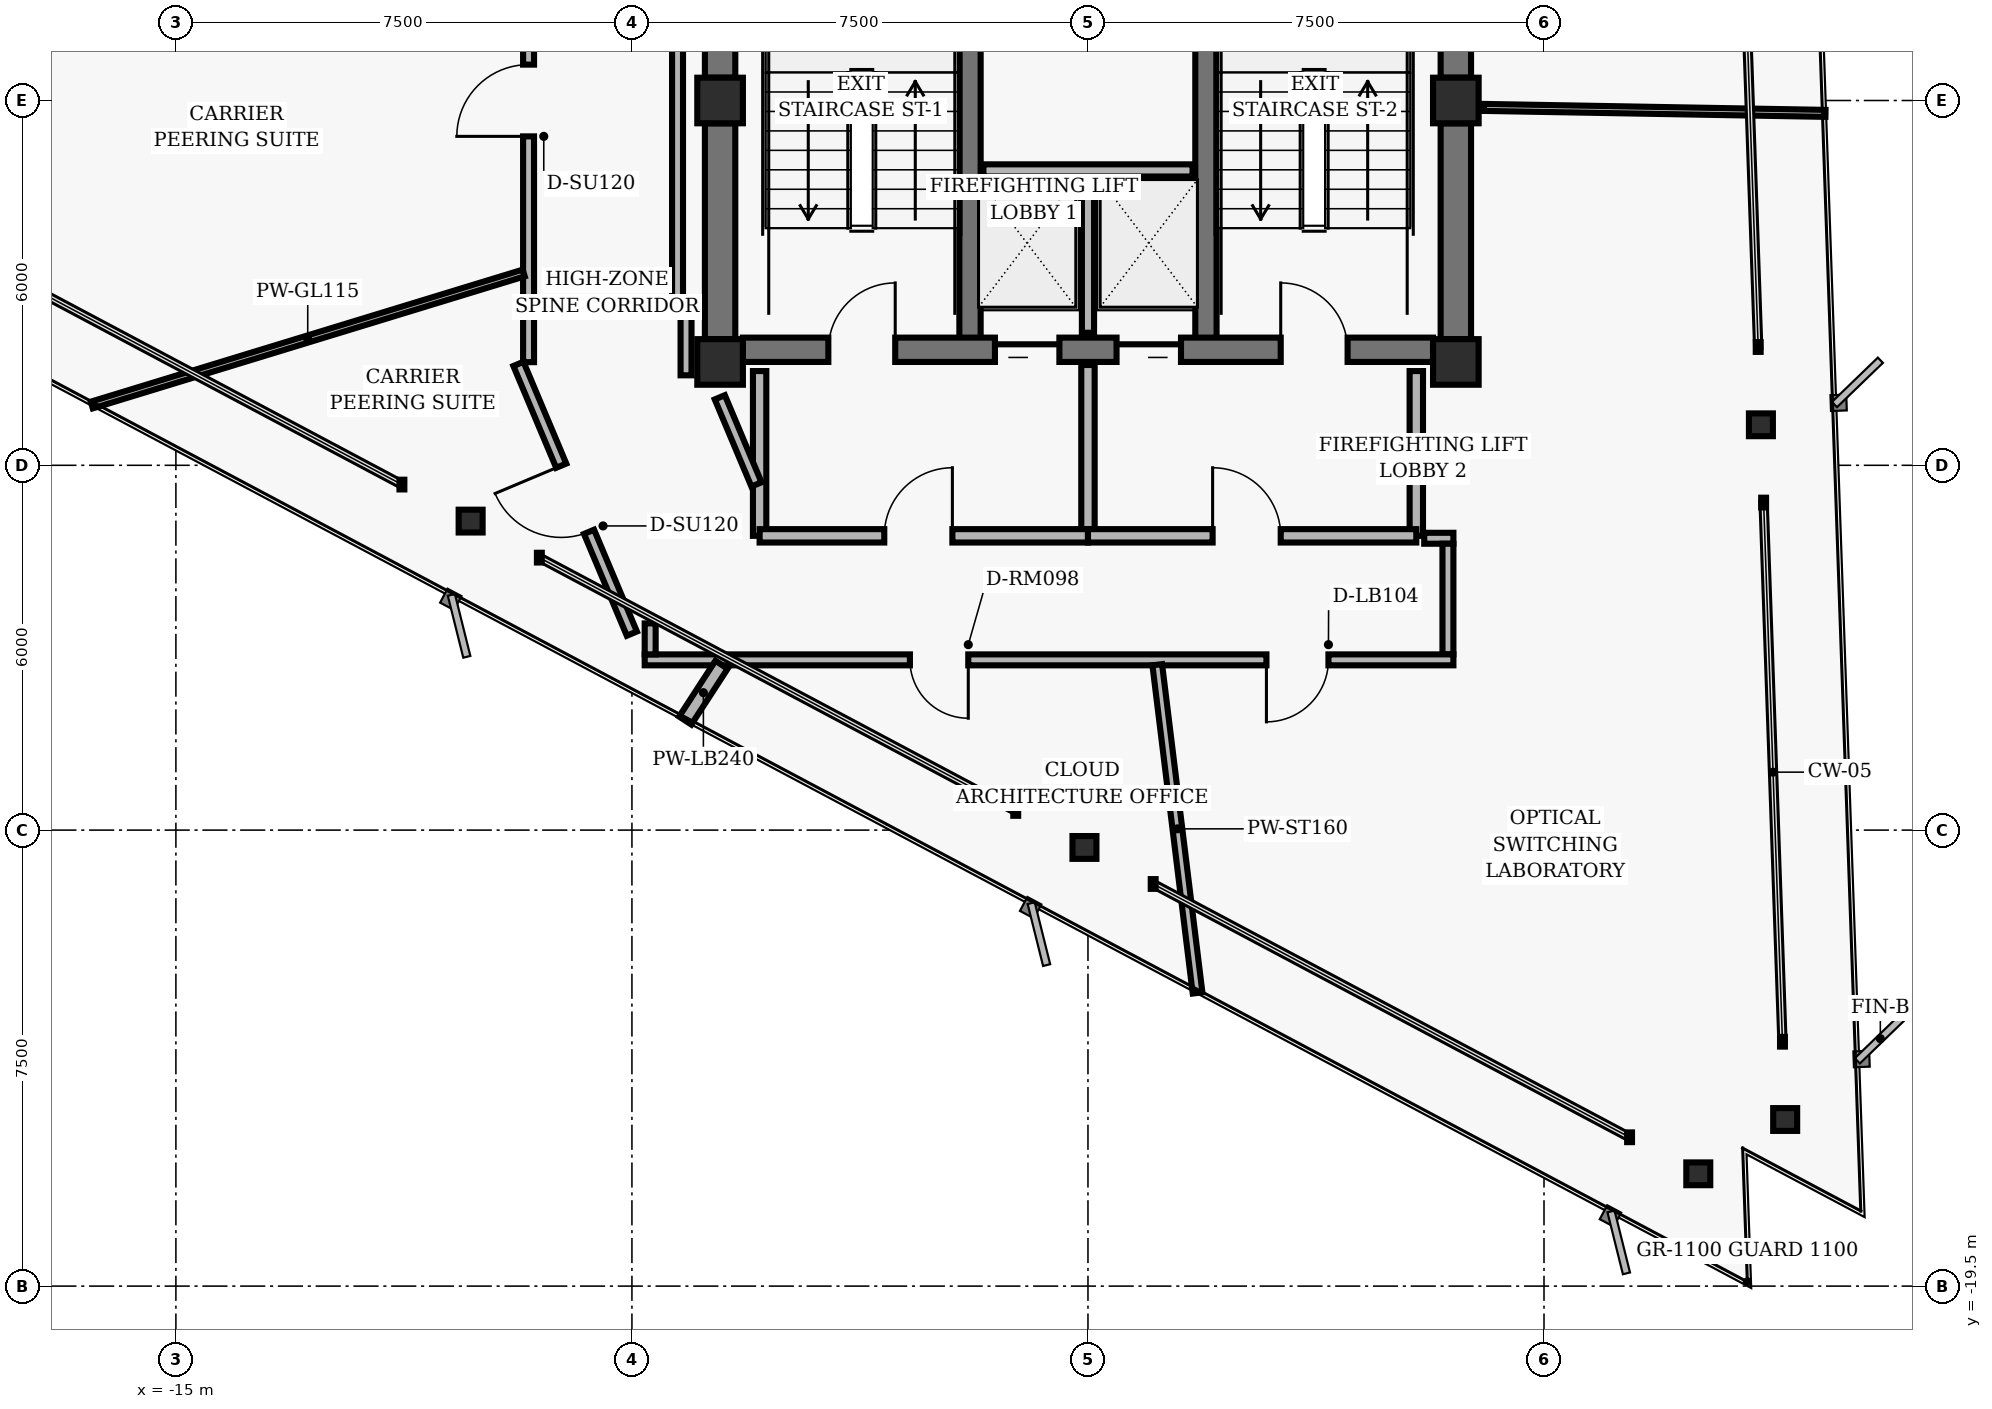
"""IFC4 building model, lengths in metres.
Left out: names, types, materials, properties, quantities, classifications, styles, units other than length and angle.
Written with IfcOpenShell. Run it as: python <this file> out.ifc"""

import sys

from ifc_helpers import new_model, si_unit, direction, frame, frame_2d, origin, origin_2d, place, context, subcontext, project, spatial, rectangle, hollow_rectangle, i_section, extrude, element, fill, save


model = new_model("IFC4")
c1 = context("Model", 3, precision=1e-05, world=origin(), true_north=direction((0.0, 1.0)))
c2 = subcontext(c1, "Body", "Model", "MODEL_VIEW")
j1 = project(units=[si_unit("LENGTHUNIT", "METRE"), si_unit("PLANEANGLEUNIT", "RADIAN")], contexts=[c1])
p1 = place(None, origin())
s1 = spatial("IfcSite", under=j1, at=p1, CompositionType="ELEMENT")
p2 = place(p1, origin())
s2 = spatial("IfcBuilding", under=s1, at=p2, CompositionType="ELEMENT")
p3 = place(p2, frame((0.0, 0.0, 208.8)))
s3 = spatial("IfcBuildingStorey", under=s2, at=p3, CompositionType="ELEMENT", Elevation=208.8)
for number, where, z_axis, x_axis in (
    (1, (-6.05, 0.0, 0.0), (0.0, 0.0, 1.0), (1.0, 0.0, 0.0)),
    (2, (6.05, 0.0, 0.0), (0.0, 0.0, 1.0), (1.0, 0.0, 0.0)),
    (3, (-6.05, -4.3, 0.0), (0.0, 0.0, 1.0), (1.0, 0.0, 0.0)),
    (4, (6.05, -4.3, 0.0), (0.0, 0.0, 1.0), (1.0, 0.0, 0.0)),
):
    element("IfcColumn", number, at=place(p3, frame(where, z_axis=z_axis, x_axis=x_axis)), inside=s3, PredefinedType="COLUMN", context=c2, shape_type="SweptSolid", body=[
        extrude(hollow_rectangle(XDim=0.75, YDim=0.75, WallThickness=0.05, InnerFilletRadius=0.02, OuterFilletRadius=0.04, at=origin_2d()), origin(), (0.0, 0.0, 1.0), 3.04),
    ])
p4 = place(p3, frame((-6.05, 0.375, 0.0), z_axis=(0.0, 0.0, 1.0), x_axis=(0.0, 1.0, 0.0)))
e5 = element("IfcWall", 5, at=p4, inside=s3, PredefinedType="SHEAR", context=c2, shape_type="SweptSolid", body=[
    extrude(rectangle(XDim=3.75, YDim=0.5, at=frame_2d((1.875, 0.0))), origin(), (0.0, 0.0, 1.0), 2.798),
])
p5 = place(p3, frame((-6.05, -3.925, 0.0), z_axis=(0.0, 0.0, 1.0), x_axis=(0.0, 1.0, 0.0)))
e6 = element("IfcWall", 6, at=p5, inside=s3, PredefinedType="SHEAR", context=c2, shape_type="SweptSolid", body=[
    extrude(rectangle(XDim=3.55, YDim=0.5, at=frame_2d((1.775, 0.0))), origin(), (0.0, 0.0, 1.0), 2.798),
])
p6 = place(p3, frame((6.05, 0.375, 0.0), z_axis=(0.0, 0.0, 1.0), x_axis=(0.0, 1.0, 0.0)))
e7 = element("IfcWall", 7, at=p6, inside=s3, PredefinedType="SHEAR", context=c2, shape_type="SweptSolid", body=[
    extrude(rectangle(XDim=3.75, YDim=0.5, at=frame_2d((1.875, 0.0))), origin(), (0.0, 0.0, 1.0), 2.798),
])
p7 = place(p3, frame((6.05, -3.925, 0.0), z_axis=(0.0, 0.0, 1.0), x_axis=(0.0, 1.0, 0.0)))
e8 = element("IfcWall", 8, at=p7, inside=s3, PredefinedType="SHEAR", context=c2, shape_type="SweptSolid", body=[
    extrude(rectangle(XDim=3.55, YDim=0.5, at=frame_2d((1.775, 0.0))), origin(), (0.0, 0.0, 1.0), 2.798),
])
for number, where, z_axis, x_axis in (
    (9, (-1.94, -4.1, 0.0), (0.0, 0.0, 1.0), (0.0, 1.0, 0.0)),
    (10, (1.94, -4.1, 0.0), (0.0, 0.0, 1.0), (0.0, 1.0, 0.0)),
):
    element("IfcWall", number, at=place(p3, frame(where, z_axis=z_axis, x_axis=x_axis)), inside=s3, PredefinedType="SHEAR", context=c2, shape_type="SweptSolid", body=[
        extrude(rectangle(XDim=8.2, YDim=0.35, at=frame_2d((4.1, 0.0))), origin(), (0.0, 0.0, 1.0), 2.798),
    ])
p8 = place(p3, frame((-5.675, -4.1, 0.0), z_axis=(0.0, 0.0, 1.0), x_axis=(1.0, 0.0, 0.0)))
e11 = element("IfcWall", 11, at=p8, inside=s3, PredefinedType="SHEAR", context=c2, shape_type="SweptSolid", body=[
    extrude(rectangle(XDim=11.35, YDim=0.4, at=frame_2d((5.675, 0.0))), origin(), (0.0, 0.0, 1.0), 2.798),
])
p9 = place(p8, frame((1.405, 0.0, 0.0)))
e12 = element("IfcOpeningElement", 12, at=p9, cuts=e11, PredefinedType="OPENING", context=c2, shape_type="SweptSolid", body=[
    extrude(rectangle(XDim=1.1, YDim=2.04, at=frame_2d((0.55, 1.02))), frame((0.0, 0.21, 0.0), z_axis=(0.0, -1.0, 0.0), x_axis=(1.0, 0.0, 0.0)), (0.0, 0.0, 1.0), 0.42),
])
p10 = place(p8, frame((8.845, 0.0, 0.0)))
e13 = element("IfcOpeningElement", 13, at=p10, cuts=e11, PredefinedType="OPENING", context=c2, shape_type="SweptSolid", body=[
    extrude(rectangle(XDim=1.1, YDim=2.04, at=frame_2d((0.55, 1.02))), frame((0.0, 0.21, 0.0), z_axis=(0.0, -1.0, 0.0), x_axis=(1.0, 0.0, 0.0)), (0.0, 0.0, 1.0), 0.42),
])
p11 = place(p8, frame((4.145, 0.0, 0.0)))
e14 = element("IfcOpeningElement", 14, at=p11, cuts=e11, PredefinedType="OPENING", context=c2, shape_type="SweptSolid", body=[
    extrude(rectangle(XDim=1.06, YDim=2.04, at=frame_2d((0.53, 1.02))), frame((0.0, 0.21, 0.0), z_axis=(0.0, -1.0, 0.0), x_axis=(1.0, 0.0, 0.0)), (0.0, 0.0, 1.0), 0.42),
])
p12 = place(p8, frame((6.145, 0.0, 0.0)))
e15 = element("IfcOpeningElement", 15, at=p12, cuts=e11, PredefinedType="OPENING", context=c2, shape_type="SweptSolid", body=[
    extrude(rectangle(XDim=1.06, YDim=2.04, at=frame_2d((0.53, 1.02))), frame((0.0, 0.21, 0.0), z_axis=(0.0, -1.0, 0.0), x_axis=(1.0, 0.0, 0.0)), (0.0, 0.0, 1.0), 0.42),
])
for number, where, z_axis, x_axis in (
    (16, (11.466, -16.76, 0.0), (0.0, 0.0, 1.0), (1.0, 0.0, 0.0)),
    (17, (11.067, -5.334, 0.0), (0.0, 0.0, 1.0), (1.0, 0.0, 0.0)),
    (18, (-10.153, -6.918, 0.0), (0.0, 0.0, 1.0), (1.0, 0.0, 0.0)),
    (19, (-0.058, -12.285, 0.0), (0.0, 0.0, 1.0), (1.0, 0.0, 0.0)),
    (20, (10.037, -17.653, 0.0), (0.0, 0.0, 1.0), (1.0, 0.0, 0.0)),
):
    element("IfcColumn", number, at=place(p3, frame(where, z_axis=z_axis, x_axis=x_axis)), inside=s3, PredefinedType="COLUMN", context=c2, shape_type="SweptSolid", body=[
        extrude(i_section(OverallWidth=0.394, OverallDepth=0.375, WebThickness=0.017, FlangeThickness=0.028, FilletRadius=0.016, at=origin_2d()), origin(), (0.0, 0.0, 1.0), 3.04),
    ])
p13 = place(p3, frame((0.0, -3.82, 0.0), z_axis=(0.0, 0.0, 1.0), x_axis=(0.0, 1.0, 0.0)))
e21 = element("IfcWall", 21, at=p13, inside=s3, PredefinedType="PARTITIONING", context=c2, shape_type="SweptSolid", body=[
    extrude(rectangle(XDim=2.67, YDim=0.2, at=frame_2d((1.335, 0.0))), origin(), (0.0, 0.0, 1.0), 2.773),
])
p14 = place(p3, frame((-1.72, -1.15, 0.0), z_axis=(0.0, 0.0, 1.0), x_axis=(1.0, 0.0, 0.0)))
e22 = element("IfcWall", 22, at=p14, inside=s3, PredefinedType="PARTITIONING", context=c2, shape_type="SweptSolid", body=[
    extrude(rectangle(XDim=3.44, YDim=0.2, at=frame_2d((1.72, 0.0))), origin(), (0.0, 0.0, 1.0), 2.773),
])
for number, where, z_axis, x_axis in (
    (23, (-5.4, -7.16, 0.0), (0.0, 0.0, 1.0), (0.0, 1.0, 0.0)),
    (24, (5.4, -7.16, 0.0), (0.0, 0.0, 1.0), (0.0, 1.0, 0.0)),
):
    element("IfcWall", number, at=place(p3, frame(where, z_axis=z_axis, x_axis=x_axis)), inside=s3, PredefinedType="PARTITIONING", context=c2, shape_type="SweptSolid", body=[
        extrude(rectangle(XDim=2.71, YDim=0.22, at=frame_2d((1.355, 0.0))), origin(), (0.0, 0.0, 1.0), 2.773),
    ])
p15 = place(p3, frame((0.0, -7.16, 0.0), z_axis=(0.0, 0.0, 1.0), x_axis=(0.0, 1.0, 0.0)))
e25 = element("IfcWall", 25, at=p15, inside=s3, PredefinedType="PARTITIONING", context=c2, shape_type="SweptSolid", body=[
    extrude(rectangle(XDim=2.81, YDim=0.22, at=frame_2d((1.405, 0.0))), origin(), (0.0, 0.0, 1.0), 2.773),
])
p16 = place(p3, frame((-5.4, -7.16, 0.0), z_axis=(0.0, 0.0, 1.0), x_axis=(1.0, 0.0, 0.0)))
e26 = element("IfcWall", 26, at=p16, inside=s3, PredefinedType="PARTITIONING", context=c2, shape_type="SweptSolid", body=[
    extrude(rectangle(XDim=5.4, YDim=0.22, at=frame_2d((2.7, 0.0))), origin(), (0.0, 0.0, 1.0), 2.395),
])
p17 = place(p16, frame((2.05, 0.0, 0.0)))
e27 = element("IfcOpeningElement", 27, at=p17, cuts=e26, PredefinedType="OPENING", context=c2, shape_type="SweptSolid", body=[
    extrude(rectangle(XDim=1.12, YDim=2.02, at=frame_2d((0.56, 1.01))), frame((0.0, 0.12, 0.0), z_axis=(0.0, -1.0, 0.0), x_axis=(1.0, 0.0, 0.0)), (0.0, 0.0, 1.0), 0.24),
])
p18 = place(p3, frame((0.0, -7.16, 0.0), z_axis=(0.0, 0.0, 1.0), x_axis=(1.0, 0.0, 0.0)))
e28 = element("IfcWall", 28, at=p18, inside=s3, PredefinedType="PARTITIONING", context=c2, shape_type="SweptSolid", body=[
    extrude(rectangle(XDim=5.4, YDim=0.22, at=frame_2d((2.7, 0.0))), origin(), (0.0, 0.0, 1.0), 2.773),
])
p19 = place(p18, frame((2.05, 0.0, 0.0)))
e29 = element("IfcOpeningElement", 29, at=p19, cuts=e28, PredefinedType="OPENING", context=c2, shape_type="SweptSolid", body=[
    extrude(rectangle(XDim=1.12, YDim=2.02, at=frame_2d((0.56, 1.01))), frame((0.0, 0.12, 0.0), z_axis=(0.0, -1.0, 0.0), x_axis=(1.0, 0.0, 0.0)), (0.0, 0.0, 1.0), 0.24),
])
p20 = place(p3, frame((-7.501, -8.769, 0.0), z_axis=(0.0, 0.0, 1.0), x_axis=(-0.387573945081, 0.921838617706, 0.0)))
e30 = element("IfcWall", 30, at=p20, inside=s3, PredefinedType="PARTITIONING", context=c2, shape_type="SweptSolid", body=[
    extrude(rectangle(XDim=4.813, YDim=0.18, at=frame_2d((2.407, 0.0))), origin(), (0.0, 0.0, 1.0), 2.773),
])
p21 = place(p20, frame((1.817, 0.0, 0.0)))
e31 = element("IfcOpeningElement", 31, at=p21, cuts=e30, PredefinedType="OPENING", context=c2, shape_type="SweptSolid", body=[
    extrude(rectangle(XDim=1.18, YDim=2.02, at=frame_2d((0.59, 1.01))), frame((0.0, 0.1, 0.0), z_axis=(0.0, -1.0, 0.0), x_axis=(1.0, 0.0, 0.0)), (0.0, 0.0, 1.0), 0.2),
])
p22 = place(p3, frame((-9.2, -4.303, 0.0), z_axis=(0.0, 0.0, 1.0), x_axis=(0.0, 1.0, 0.0)))
e32 = element("IfcWall", 32, at=p22, inside=s3, PredefinedType="PARTITIONING", context=c2, shape_type="SweptSolid", body=[
    extrude(rectangle(XDim=8.607, YDim=0.18, at=frame_2d((4.303, 0.0))), origin(), (0.0, 0.0, 1.0), 2.773),
])
p23 = place(p22, frame((3.713, 0.0, 0.0)))
e33 = element("IfcOpeningElement", 33, at=p23, cuts=e32, PredefinedType="OPENING", context=c2, shape_type="SweptSolid", body=[
    extrude(rectangle(XDim=1.18, YDim=2.02, at=frame_2d((0.59, 1.01))), frame((0.0, 0.1, 0.0), z_axis=(0.0, -1.0, 0.0), x_axis=(1.0, 0.0, 0.0)), (0.0, 0.0, 1.0), 0.2),
])
p24 = place(p3, frame((-6.75, 3.273, 0.0), z_axis=(0.0, 0.0, 1.0), x_axis=(0.0, -1.0, 0.0)))
e34 = element("IfcWall", 34, at=p24, inside=s3, PredefinedType="PARTITIONING", context=c2, shape_type="SweptSolid", body=[
    extrude(rectangle(XDim=6.547, YDim=0.18, at=frame_2d((3.273, 0.0))), origin(), (0.0, 0.0, 1.0), 2.773),
])
p25 = place(p3, frame((-6.61, -3.541, 0.0), z_axis=(0.0, 0.0, 1.0), x_axis=(0.0, -1.0, 0.0)))
e35 = element("IfcWall", 35, at=p25, inside=s3, PredefinedType="PARTITIONING", context=c2, shape_type="SweptSolid", body=[
    extrude(rectangle(XDim=0.979, YDim=0.18, at=frame_2d((0.489, 0.0))), origin(), (0.0, 0.0, 1.0), 2.773),
])
p26 = place(p3, frame((-6.055, -4.882, 0.0), z_axis=(0.0, 0.0, 1.0), x_axis=(0.387579540458, -0.921836265189, 0.0)))
e36 = element("IfcWall", 36, at=p26, inside=s3, PredefinedType="PARTITIONING", context=c2, shape_type="SweptSolid", body=[
    extrude(rectangle(XDim=1.555, YDim=0.18, at=frame_2d((0.777, 0.0))), origin(), (0.0, 0.0, 1.0), 2.253),
])
p27 = place(p3, frame((5.53, -7.2, 0.0), z_axis=(0.0, 0.0, 1.0), x_axis=(1.0, 0.0, 0.0)))
e37 = element("IfcWall", 37, at=p27, inside=s3, PredefinedType="PARTITIONING", context=c2, shape_type="SweptSolid", body=[
    extrude(rectangle(XDim=0.48, YDim=0.18, at=frame_2d((0.24, 0.0))), origin(), (0.0, 0.0, 1.0), 2.773),
])
p28 = place(p3, frame((5.92, -7.29, 0.0), z_axis=(0.0, 0.0, 1.0), x_axis=(0.0, -1.0, 0.0)))
e38 = element("IfcWall", 38, at=p28, inside=s3, PredefinedType="PARTITIONING", context=c2, shape_type="SweptSolid", body=[
    extrude(rectangle(XDim=1.82, YDim=0.18, at=frame_2d((0.91, 0.0))), origin(), (0.0, 0.0, 1.0), 2.773),
])
p29 = place(p3, frame((6.01, -9.2, 0.0), z_axis=(0.0, 0.0, 1.0), x_axis=(-1.0, 0.0, 0.0)))
e39 = element("IfcWall", 39, at=p29, inside=s3, PredefinedType="PARTITIONING", context=c2, shape_type="SweptSolid", body=[
    extrude(rectangle(XDim=13.3, YDim=0.18, at=frame_2d((6.65, 0.0))), origin(), (0.0, 0.0, 1.0), 2.395),
])
p30 = place(p29, frame((7.979, 0.0, 0.0)))
e40 = element("IfcOpeningElement", 40, at=p30, cuts=e39, PredefinedType="OPENING", context=c2, shape_type="SweptSolid", body=[
    extrude(rectangle(XDim=0.96, YDim=2.02, at=frame_2d((0.48, 1.01))), frame((0.0, 0.1, 0.0), z_axis=(0.0, -1.0, 0.0), x_axis=(1.0, 0.0, 0.0)), (0.0, 0.0, 1.0), 0.2),
])
p31 = place(p29, frame((2.055, 0.0, 0.0)))
e41 = element("IfcOpeningElement", 41, at=p31, cuts=e39, PredefinedType="OPENING", context=c2, shape_type="SweptSolid", body=[
    extrude(rectangle(XDim=1.02, YDim=2.02, at=frame_2d((0.51, 1.01))), frame((0.0, 0.1, 0.0), z_axis=(0.0, -1.0, 0.0), x_axis=(1.0, 0.0, 0.0)), (0.0, 0.0, 1.0), 0.2),
])
p32 = place(p3, frame((-7.2, -9.11, 0.0), z_axis=(0.0, 0.0, 1.0), x_axis=(0.0, 1.0, 0.0)))
e42 = element("IfcWall", 42, at=p32, inside=s3, PredefinedType="PARTITIONING", context=c2, shape_type="SweptSolid", body=[
    extrude(rectangle(XDim=0.51, YDim=0.18, at=frame_2d((0.255, 0.0))), origin(), (0.0, 0.0, 1.0), 2.773),
])
p33 = place(p3, frame((-9.28, -2.837, 0.0), z_axis=(0.0, 0.0, 1.0), x_axis=(-0.956303337488, -0.292376344307, 0.0)))
e43 = element("IfcWall", 43, at=p33, inside=s3, PredefinedType="MOVABLE", context=c2, shape_type="SweptSolid", body=[
    extrude(rectangle(XDim=7.428, YDim=0.115, at=frame_2d((3.714, 0.0))), origin(), (0.0, 0.0, 1.0), 2.773),
])
p34 = place(p3, frame((-6.027, -9.28, 0.0), z_axis=(0.0, 0.0, 1.0), x_axis=(-0.544526030547, -0.838743943082, 0.0)))
e44 = element("IfcWall", 44, at=p34, inside=s3, PredefinedType="PARTITIONING", context=c2, shape_type="SweptSolid", body=[
    extrude(rectangle(XDim=1.095, YDim=0.24, at=frame_2d((0.548, 0.0))), origin(), (0.0, 0.0, 1.0), 2.773),
])
p35 = place(p3, frame((1.139, -9.28, 0.0), z_axis=(0.0, 0.0, 1.0), x_axis=(0.121863374105, -0.992546884561, 0.0)))
e45 = element("IfcWall", 45, at=p35, inside=s3, PredefinedType="PARTITIONING", context=c2, shape_type="SweptSolid", body=[
    extrude(rectangle(XDim=5.439, YDim=0.16, at=frame_2d((2.72, 0.0))), origin(), (0.0, 0.0, 1.0), 2.773),
])
p36 = place(p3, frame((6.51, -0.114, 0.0), z_axis=(0.0, 0.0, 1.0), x_axis=(0.999847502382, -0.017463446992, 0.0)))
e46 = element("IfcWall", 46, at=p36, inside=s3, PredefinedType="MOVABLE", context=c2, shape_type="SweptSolid", body=[
    extrude(rectangle(XDim=5.62, YDim=0.115, at=frame_2d((2.81, 0.0))), origin(), (0.0, 0.0, 1.0), 2.773),
])
p37 = place(p9, origin())
e47 = element("IfcDoor", 47, at=p37, inside=s3, OperationType="SINGLE_SWING_RIGHT", PredefinedType="DOOR", context=c2, shape_type="SweptSolid", body=[
    extrude(rectangle(XDim=1.1, YDim=2.04, at=frame_2d((0.55, 1.02))), frame((0.0, 0.025, 0.0), z_axis=(0.0, -1.0, 0.0), x_axis=(1.0, 0.0, 0.0)), (0.0, 0.0, 1.0), 0.05),
])
fill(e12, e47)
p38 = place(p10, origin())
e48 = element("IfcDoor", 48, at=p38, inside=s3, OperationType="SINGLE_SWING_LEFT", PredefinedType="DOOR", context=c2, shape_type="SweptSolid", body=[
    extrude(rectangle(XDim=1.1, YDim=2.04, at=frame_2d((0.55, 1.02))), frame((0.0, 0.025, 0.0), z_axis=(0.0, -1.0, 0.0), x_axis=(1.0, 0.0, 0.0)), (0.0, 0.0, 1.0), 0.05),
])
fill(e13, e48)
p39 = place(p11, origin())
e49 = element("IfcDoor", 49, at=p39, inside=s3, OperationType="SLIDING_TO_LEFT", PredefinedType="DOOR", context=c2, shape_type="SweptSolid", body=[
    extrude(rectangle(XDim=1.06, YDim=2.04, at=frame_2d((0.53, 1.02))), frame((0.0, 0.025, 0.0), z_axis=(0.0, -1.0, 0.0), x_axis=(1.0, 0.0, 0.0)), (0.0, 0.0, 1.0), 0.05),
])
fill(e14, e49)
p40 = place(p12, origin())
e50 = element("IfcDoor", 50, at=p40, inside=s3, OperationType="SLIDING_TO_RIGHT", PredefinedType="DOOR", context=c2, shape_type="SweptSolid", body=[
    extrude(rectangle(XDim=1.06, YDim=2.04, at=frame_2d((0.53, 1.02))), frame((0.0, 0.025, 0.0), z_axis=(0.0, -1.0, 0.0), x_axis=(1.0, 0.0, 0.0)), (0.0, 0.0, 1.0), 0.05),
])
fill(e15, e50)
p41 = place(p17, origin())
e51 = element("IfcDoor", 51, at=p41, inside=s3, OperationType="SINGLE_SWING_RIGHT", PredefinedType="DOOR", context=c2, shape_type="SweptSolid", body=[
    extrude(rectangle(XDim=1.12, YDim=2.02, at=frame_2d((0.56, 1.01))), frame((0.0, 0.025, 0.0), z_axis=(0.0, -1.0, 0.0), x_axis=(1.0, 0.0, 0.0)), (0.0, 0.0, 1.0), 0.05),
])
fill(e27, e51)
p42 = place(p19, origin())
e52 = element("IfcDoor", 52, at=p42, inside=s3, OperationType="SINGLE_SWING_LEFT", PredefinedType="DOOR", context=c2, shape_type="SweptSolid", body=[
    extrude(rectangle(XDim=1.12, YDim=2.02, at=frame_2d((0.56, 1.01))), frame((0.0, 0.025, 0.0), z_axis=(0.0, -1.0, 0.0), x_axis=(1.0, 0.0, 0.0)), (0.0, 0.0, 1.0), 0.05),
])
fill(e29, e52)
p43 = place(p23, origin())
e53 = element("IfcDoor", 53, at=p43, inside=s3, OperationType="SINGLE_SWING_LEFT", PredefinedType="DOOR", context=c2, shape_type="SweptSolid", body=[
    extrude(rectangle(XDim=1.18, YDim=2.02, at=frame_2d((0.59, 1.01))), frame((0.0, 0.025, 0.0), z_axis=(0.0, -1.0, 0.0), x_axis=(1.0, 0.0, 0.0)), (0.0, 0.0, 1.0), 0.05),
])
fill(e33, e53)
p44 = place(p21, origin())
e54 = element("IfcDoor", 54, at=p44, inside=s3, OperationType="SINGLE_SWING_RIGHT", PredefinedType="DOOR", context=c2, shape_type="SweptSolid", body=[
    extrude(rectangle(XDim=1.18, YDim=2.02, at=frame_2d((0.59, 1.01))), frame((0.0, 0.025, 0.0), z_axis=(0.0, -1.0, 0.0), x_axis=(1.0, 0.0, 0.0)), (0.0, 0.0, 1.0), 0.05),
])
fill(e31, e54)
p45 = place(p30, origin())
e55 = element("IfcDoor", 55, at=p45, inside=s3, OperationType="SINGLE_SWING_LEFT", PredefinedType="DOOR", context=c2, shape_type="SweptSolid", body=[
    extrude(rectangle(XDim=0.96, YDim=2.02, at=frame_2d((0.48, 1.01))), frame((0.0, 0.025, 0.0), z_axis=(0.0, -1.0, 0.0), x_axis=(1.0, 0.0, 0.0)), (0.0, 0.0, 1.0), 0.05),
])
fill(e40, e55)
p46 = place(p31, origin())
e56 = element("IfcDoor", 56, at=p46, inside=s3, OperationType="SINGLE_SWING_RIGHT", PredefinedType="DOOR", context=c2, shape_type="SweptSolid", body=[
    extrude(rectangle(XDim=1.02, YDim=2.02, at=frame_2d((0.51, 1.01))), frame((0.0, 0.025, 0.0), z_axis=(0.0, -1.0, 0.0), x_axis=(1.0, 0.0, 0.0)), (0.0, 0.0, 1.0), 0.05),
])
fill(e41, e56)
save(model, sys.argv[1])
